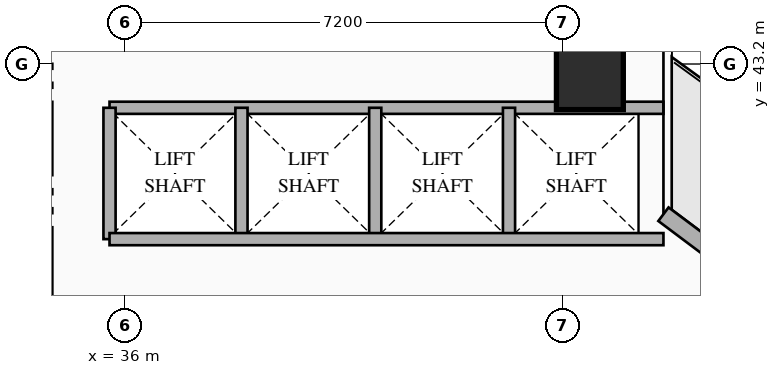
"""IFC4 building model, lengths in metres.
Left out: names, types, materials, properties, quantities, classifications, styles, units other than length and angle.
Written with IfcOpenShell. Run it as: python <this file> out.ifc"""

import sys

from ifc_helpers import new_model, si_unit, direction, frame, frame_2d, origin, origin_2d, place, context, subcontext, project, spatial, rectangle, extrude, element, save


model = new_model("IFC4")
c1 = context("Model", 3, precision=1e-05, world=origin(), true_north=direction((0.0, 1.0)))
c2 = subcontext(c1, "Body", "Model", "MODEL_VIEW")
j1 = project(units=[si_unit("LENGTHUNIT", "METRE"), si_unit("PLANEANGLEUNIT", "RADIAN")], contexts=[c1])
p1 = place(None, origin())
s1 = spatial("IfcSite", under=j1, at=p1, CompositionType="ELEMENT")
p2 = place(p1, origin())
s2 = spatial("IfcBuilding", under=s1, at=p2, CompositionType="ELEMENT")
p3 = place(p2, frame((0.0, 0.0, 63.4)))
s3 = spatial("IfcBuildingStorey", under=s2, at=p3, CompositionType="ELEMENT", Elevation=63.4)
p4 = place(p3, frame((43.65, 43.0, 0.0), z_axis=(0.0, 0.0, 1.0), x_axis=(1.0, 0.0, 0.0)))
e1 = element("IfcColumn", 1, at=p4, inside=s3, PredefinedType="COLUMN", context=c2, shape_type="SweptSolid", body=[
    extrude(rectangle(XDim=1.1, YDim=1.1, at=origin_2d()), origin(), (0.0, 0.0, 1.0), 3.35),
])
p5 = place(p3, frame((44.86, 40.73, 0.0), z_axis=(0.0, 0.0, 1.0), x_axis=(0.800006902154, -0.599990797017, 0.0)))
e2 = element("IfcWall", 2, at=p5, inside=s3, PredefinedType="STANDARD", context=c2, shape_type="SweptSolid", body=[
    extrude(rectangle(XDim=29.712, YDim=0.28, at=frame_2d((14.856, 0.0))), origin(), (0.0, 0.0, 1.0), 3.13),
])
p6 = place(p5, frame((14.249, 0.0, 0.0)))
e3 = element("IfcOpeningElement", 3, at=p6, cuts=e2, PredefinedType="OPENING", context=c2, shape_type="SweptSolid", body=[
    extrude(rectangle(XDim=1.1, YDim=2.2, at=frame_2d((0.55, 1.1))), frame((0.0, 0.15, 0.0), z_axis=(0.0, -1.0, 0.0), x_axis=(1.0, 0.0, 0.0)), (0.0, 0.0, 1.0), 0.3),
])
p7 = place(p5, frame((1.612, 0.0, 0.85)))
e4 = element("IfcOpeningElement", 4, at=p7, cuts=e2, PredefinedType="OPENING", context=c2, shape_type="SweptSolid", body=[
    extrude(rectangle(XDim=1.4, YDim=1.8, at=frame_2d((0.7, 0.9))), frame((0.0, 0.15, 0.0), z_axis=(0.0, -1.0, 0.0), x_axis=(1.0, 0.0, 0.0)), (0.0, 0.0, 1.0), 0.3),
])
p8 = place(p5, frame((5.667, 0.0, 0.85)))
e5 = element("IfcOpeningElement", 5, at=p8, cuts=e2, PredefinedType="OPENING", context=c2, shape_type="SweptSolid", body=[
    extrude(rectangle(XDim=1.4, YDim=1.8, at=frame_2d((0.7, 0.9))), frame((0.0, 0.15, 0.0), z_axis=(0.0, -1.0, 0.0), x_axis=(1.0, 0.0, 0.0)), (0.0, 0.0, 1.0), 0.3),
])
p9 = place(p5, frame((9.912, 0.0, 0.85)))
e6 = element("IfcOpeningElement", 6, at=p9, cuts=e2, PredefinedType="OPENING", context=c2, shape_type="SweptSolid", body=[
    extrude(rectangle(XDim=1.4, YDim=1.8, at=frame_2d((0.7, 0.9))), frame((0.0, 0.15, 0.0), z_axis=(0.0, -1.0, 0.0), x_axis=(1.0, 0.0, 0.0)), (0.0, 0.0, 1.0), 0.3),
])
p10 = place(p5, frame((19.528, 0.0, 0.85)))
e7 = element("IfcOpeningElement", 7, at=p10, cuts=e2, PredefinedType="OPENING", context=c2, shape_type="SweptSolid", body=[
    extrude(rectangle(XDim=1.4, YDim=1.8, at=frame_2d((0.7, 0.9))), frame((0.0, 0.15, 0.0), z_axis=(0.0, -1.0, 0.0), x_axis=(1.0, 0.0, 0.0)), (0.0, 0.0, 1.0), 0.3),
])
p11 = place(p5, frame((23.451, 0.0, 0.85)))
e8 = element("IfcOpeningElement", 8, at=p11, cuts=e2, PredefinedType="OPENING", context=c2, shape_type="SweptSolid", body=[
    extrude(rectangle(XDim=1.4, YDim=1.8, at=frame_2d((0.7, 0.9))), frame((0.0, 0.15, 0.0), z_axis=(0.0, -1.0, 0.0), x_axis=(1.0, 0.0, 0.0)), (0.0, 0.0, 1.0), 0.3),
])
p12 = place(p5, frame((27.852, 0.0, 0.85)))
e9 = element("IfcOpeningElement", 9, at=p12, cuts=e2, PredefinedType="OPENING", context=c2, shape_type="SweptSolid", body=[
    extrude(rectangle(XDim=1.4, YDim=1.8, at=frame_2d((0.7, 0.9))), frame((0.0, 0.15, 0.0), z_axis=(0.0, -1.0, 0.0), x_axis=(1.0, 0.0, 0.0)), (0.0, 0.0, 1.0), 0.3),
])
p13 = place(p3, frame((35.75, 42.48, 0.0), z_axis=(0.0, 0.0, 1.0), x_axis=(1.0, 0.0, 0.0)))
e10 = element("IfcWall", 10, at=p13, inside=s3, PredefinedType="STANDARD", context=c2, shape_type="SweptSolid", body=[
    extrude(rectangle(XDim=9.11, YDim=0.2, at=frame_2d((4.555, 0.0))), origin(), (0.0, 0.0, 1.0), 3.13),
])
for number, where, z_axis, x_axis in (
    (11, (35.75, 40.32, 0.0), (0.0, 0.0, 1.0), (0.0, 1.0, 0.0)),
    (12, (37.92, 40.32, 0.0), (0.0, 0.0, 1.0), (0.0, 1.0, 0.0)),
    (13, (40.12, 40.32, 0.0), (0.0, 0.0, 1.0), (0.0, 1.0, 0.0)),
    (14, (42.32, 40.32, 0.0), (0.0, 0.0, 1.0), (0.0, 1.0, 0.0)),
):
    element("IfcWall", number, at=place(p3, frame(where, z_axis=z_axis, x_axis=x_axis)), inside=s3, PredefinedType="STANDARD", context=c2, shape_type="SweptSolid", body=[
        extrude(rectangle(XDim=2.16, YDim=0.2, at=frame_2d((1.08, 0.0))), origin(), (0.0, 0.0, 1.0), 3.13),
    ])
p14 = place(p3, frame((35.75, 40.32, 0.0), z_axis=(0.0, 0.0, 1.0), x_axis=(1.0, 0.0, 0.0)))
e15 = element("IfcWall", 15, at=p14, inside=s3, PredefinedType="STANDARD", context=c2, shape_type="SweptSolid", body=[
    extrude(rectangle(XDim=9.11, YDim=0.2, at=frame_2d((4.555, 0.0))), origin(), (0.0, 0.0, 1.0), 3.13),
])
save(model, sys.argv[1])
